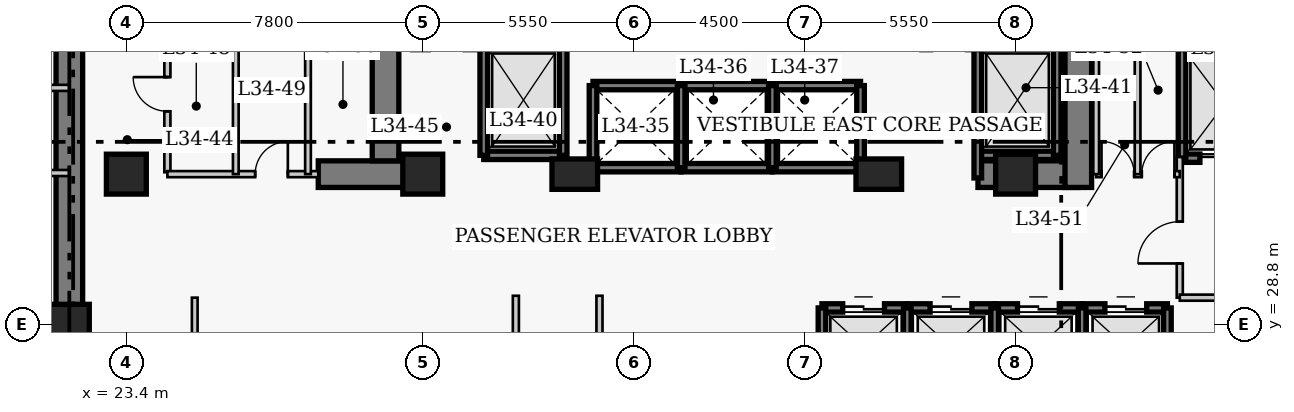
"""IFC4 building model, lengths in metres.
Left out: names, types, materials, properties, quantities, classifications, styles, units other than length and angle.
Written with IfcOpenShell. Run it as: python <this file> out.ifc"""

import sys

from ifc_helpers import new_model, si_unit, direction, frame, frame_2d, origin, origin_2d, place, context, subcontext, project, spatial, rectangle, extrude, element, fill, save


model = new_model("IFC4")
c1 = context("Model", 3, precision=1e-05, world=origin(), true_north=direction((0.0, 1.0)))
c2 = subcontext(c1, "Body", "Model", "MODEL_VIEW")
j1 = project(units=[si_unit("LENGTHUNIT", "METRE"), si_unit("PLANEANGLEUNIT", "RADIAN")], contexts=[c1])
p1 = place(None, origin())
s1 = spatial("IfcSite", under=j1, at=p1, CompositionType="ELEMENT")
p2 = place(p1, origin())
s2 = spatial("IfcBuilding", under=s1, at=p2, CompositionType="ELEMENT")
p3 = place(p2, frame((0.0, 0.0, 138.4)))
s3 = spatial("IfcBuildingStorey", under=s2, at=p3, CompositionType="ELEMENT", Elevation=138.4)
p4 = place(p3, frame((21.9, 27.05, 0.0), z_axis=(0.0, 0.0, 1.0), x_axis=(0.0, 1.0, 0.0)))
e1 = element("IfcWall", 1, at=p4, inside=s3, PredefinedType="SHEAR", context=c2, shape_type="SweptSolid", body=[
    extrude(rectangle(XDim=13.62, YDim=0.7, at=frame_2d((6.81, 0.0))), origin(), (0.0, 0.0, 1.0), 3.8),
])
p5 = place(p3, frame((28.45, 32.75, 0.0), z_axis=(0.0, 0.0, 1.0), x_axis=(1.0, 0.0, 0.0)))
e2 = element("IfcWall", 2, at=p5, inside=s3, PredefinedType="SHEAR", context=c2, shape_type="SweptSolid", body=[
    extrude(rectangle(XDim=2.4, YDim=0.7, at=frame_2d((1.2, 0.0))), origin(), (0.0, 0.0, 1.0), 3.8),
])
p6 = place(p3, frame((45.81, 32.75, 0.0), z_axis=(0.0, 0.0, 1.0), x_axis=(1.0, 0.0, 0.0)))
e3 = element("IfcWall", 3, at=p6, inside=s3, PredefinedType="SHEAR", context=c2, shape_type="SweptSolid", body=[
    extrude(rectangle(XDim=2.64, YDim=0.7, at=frame_2d((1.32, 0.0))), origin(), (0.0, 0.0, 1.0), 3.8),
])
p7 = place(p3, frame((30.22, 33.1, 0.0), z_axis=(0.0, 0.0, 1.0), x_axis=(0.0, 1.0, 0.0)))
e4 = element("IfcWall", 4, at=p7, inside=s3, PredefinedType="SHEAR", context=c2, shape_type="SweptSolid", body=[
    extrude(rectangle(XDim=7.22, YDim=0.7, at=frame_2d((3.61, 0.0))), origin(), (0.0, 0.0, 1.0), 3.8),
])
p8 = place(p3, frame((48.45, 32.4, 0.0), z_axis=(0.0, 0.0, 1.0), x_axis=(0.0, 1.0, 0.0)))
e5 = element("IfcWall", 5, at=p8, inside=s3, PredefinedType="SHEAR", context=c2, shape_type="SweptSolid", body=[
    extrude(rectangle(XDim=7.92, YDim=0.7, at=frame_2d((3.96, 0.0))), origin(), (0.0, 0.0, 1.0), 3.8),
])
p9 = place(p8, frame((5.8, 0.0, 0.0)))
e6 = element("IfcOpeningElement", 6, at=p9, cuts=e5, PredefinedType="OPENING", context=c2, shape_type="SweptSolid", body=[
    extrude(rectangle(XDim=1.1, YDim=2.15, at=frame_2d((0.55, 1.075))), frame((0.0, 0.36, 0.0), z_axis=(0.0, -1.0, 0.0), x_axis=(1.0, 0.0, 0.0)), (0.0, 0.0, 1.0), 0.72),
])
for number, where, z_axis, x_axis in (
    (7, (21.9, 28.8, 0.0), (0.0, 0.0, 1.0), (1.0, 0.0, 0.0)),
    (8, (23.4, 32.75, 0.0), (0.0, 0.0, 1.0), (1.0, 0.0, 0.0)),
    (9, (31.2, 32.75, 0.0), (0.0, 0.0, 1.0), (1.0, 0.0, 0.0)),
):
    element("IfcColumn", number, at=place(p3, frame(where, z_axis=z_axis, x_axis=x_axis)), inside=s3, PredefinedType="COLUMN", context=c2, shape_type="SweptSolid", body=[
        extrude(rectangle(XDim=1.05, YDim=1.05, at=origin_2d()), origin(), (0.0, 0.0, 1.0), 3.8),
    ])
for number, where, z_axis, x_axis in (
    (10, (35.2, 32.75, 0.0), (0.0, 0.0, 1.0), (1.0, 0.0, 0.0)),
    (11, (43.2, 32.75, 0.0), (0.0, 0.0, 1.0), (1.0, 0.0, 0.0)),
):
    element("IfcColumn", number, at=place(p3, frame(where, z_axis=z_axis, x_axis=x_axis)), inside=s3, PredefinedType="COLUMN", context=c2, shape_type="SweptSolid", body=[
        extrude(rectangle(XDim=1.2, YDim=0.8, at=origin_2d()), origin(), (0.0, 0.0, 1.0), 3.8),
    ])
p10 = place(p3, frame((46.8, 32.75, 0.0), z_axis=(0.0, 0.0, 1.0), x_axis=(1.0, 0.0, 0.0)))
e12 = element("IfcColumn", 12, at=p10, inside=s3, PredefinedType="COLUMN", context=c2, shape_type="SweptSolid", body=[
    extrude(rectangle(XDim=1.05, YDim=1.05, at=origin_2d()), origin(), (0.0, 0.0, 1.0), 3.8),
])
p11 = place(p3, frame((41.705, 29.23, 0.0), z_axis=(0.0, 0.0, 1.0), x_axis=(1.0, 0.0, 0.0)))
e13 = element("IfcWall", 13, at=p11, inside=s3, PredefinedType="SHEAR", context=c2, shape_type="SweptSolid", body=[
    extrude(rectangle(XDim=2.245, YDim=0.22, at=frame_2d((1.123, 0.0))), origin(), (0.0, 0.0, 1.0), 3.8),
])
p12 = place(p11, frame((0.545, 0.0, 0.0)))
e14 = element("IfcOpeningElement", 14, at=p12, cuts=e13, PredefinedType="OPENING", context=c2, shape_type="SweptSolid", body=[
    extrude(rectangle(XDim=1.1, YDim=2.15, at=frame_2d((0.55, 1.075))), frame((0.0, 0.12, 0.0), z_axis=(0.0, -1.0, 0.0), x_axis=(1.0, 0.0, 0.0)), (0.0, 0.0, 1.0), 0.24),
])
p13 = place(p3, frame((41.705, 27.17, 0.0), z_axis=(0.0, 0.0, 1.0), x_axis=(0.0, 1.0, 0.0)))
e15 = element("IfcWall", 15, at=p13, inside=s3, PredefinedType="SHEAR", context=c2, shape_type="SweptSolid", body=[
    extrude(rectangle(XDim=2.06, YDim=0.2, at=frame_2d((1.03, 0.0))), origin(), (0.0, 0.0, 1.0), 3.8),
])
p14 = place(p3, frame((43.95, 29.23, 0.0), z_axis=(0.0, 0.0, 1.0), x_axis=(1.0, 0.0, 0.0)))
e16 = element("IfcWall", 16, at=p14, inside=s3, PredefinedType="SHEAR", context=c2, shape_type="SweptSolid", body=[
    extrude(rectangle(XDim=2.3, YDim=0.22, at=frame_2d((1.15, 0.0))), origin(), (0.0, 0.0, 1.0), 3.8),
])
p15 = place(p14, frame((0.6, 0.0, 0.0)))
e17 = element("IfcOpeningElement", 17, at=p15, cuts=e16, PredefinedType="OPENING", context=c2, shape_type="SweptSolid", body=[
    extrude(rectangle(XDim=1.1, YDim=2.15, at=frame_2d((0.55, 1.075))), frame((0.0, 0.12, 0.0), z_axis=(0.0, -1.0, 0.0), x_axis=(1.0, 0.0, 0.0)), (0.0, 0.0, 1.0), 0.24),
])
p16 = place(p3, frame((43.95, 27.17, 0.0), z_axis=(0.0, 0.0, 1.0), x_axis=(0.0, 1.0, 0.0)))
e18 = element("IfcWall", 18, at=p16, inside=s3, PredefinedType="SHEAR", context=c2, shape_type="SweptSolid", body=[
    extrude(rectangle(XDim=2.06, YDim=0.2, at=frame_2d((1.03, 0.0))), origin(), (0.0, 0.0, 1.0), 3.8),
])
p17 = place(p3, frame((46.25, 29.23, 0.0), z_axis=(0.0, 0.0, 1.0), x_axis=(1.0, 0.0, 0.0)))
e19 = element("IfcWall", 19, at=p17, inside=s3, PredefinedType="SHEAR", context=c2, shape_type="SweptSolid", body=[
    extrude(rectangle(XDim=2.3, YDim=0.22, at=frame_2d((1.15, 0.0))), origin(), (0.0, 0.0, 1.0), 3.8),
])
p18 = place(p17, frame((0.6, 0.0, 0.0)))
e20 = element("IfcOpeningElement", 20, at=p18, cuts=e19, PredefinedType="OPENING", context=c2, shape_type="SweptSolid", body=[
    extrude(rectangle(XDim=1.1, YDim=2.15, at=frame_2d((0.55, 1.075))), frame((0.0, 0.12, 0.0), z_axis=(0.0, -1.0, 0.0), x_axis=(1.0, 0.0, 0.0)), (0.0, 0.0, 1.0), 0.24),
])
p19 = place(p3, frame((46.25, 27.17, 0.0), z_axis=(0.0, 0.0, 1.0), x_axis=(0.0, 1.0, 0.0)))
e21 = element("IfcWall", 21, at=p19, inside=s3, PredefinedType="SHEAR", context=c2, shape_type="SweptSolid", body=[
    extrude(rectangle(XDim=2.06, YDim=0.2, at=frame_2d((1.03, 0.0))), origin(), (0.0, 0.0, 1.0), 3.8),
])
p20 = place(p3, frame((48.55, 29.23, 0.0), z_axis=(0.0, 0.0, 1.0), x_axis=(1.0, 0.0, 0.0)))
e22 = element("IfcWall", 22, at=p20, inside=s3, PredefinedType="SHEAR", context=c2, shape_type="SweptSolid", body=[
    extrude(rectangle(XDim=2.245, YDim=0.22, at=frame_2d((1.123, 0.0))), origin(), (0.0, 0.0, 1.0), 3.8),
])
p21 = place(p20, frame((0.6, 0.0, 0.0)))
e23 = element("IfcOpeningElement", 23, at=p21, cuts=e22, PredefinedType="OPENING", context=c2, shape_type="SweptSolid", body=[
    extrude(rectangle(XDim=1.1, YDim=2.15, at=frame_2d((0.55, 1.075))), frame((0.0, 0.12, 0.0), z_axis=(0.0, -1.0, 0.0), x_axis=(1.0, 0.0, 0.0)), (0.0, 0.0, 1.0), 0.24),
])
for number, where, z_axis, x_axis in (
    (24, (48.55, 27.17, 0.0), (0.0, 0.0, 1.0), (0.0, 1.0, 0.0)),
    (25, (50.795, 27.17, 0.0), (0.0, 0.0, 1.0), (0.0, 1.0, 0.0)),
):
    element("IfcWall", number, at=place(p3, frame(where, z_axis=z_axis, x_axis=x_axis)), inside=s3, PredefinedType="SHEAR", context=c2, shape_type="SweptSolid", body=[
        extrude(rectangle(XDim=2.06, YDim=0.2, at=frame_2d((1.03, 0.0))), origin(), (0.0, 0.0, 1.0), 3.8),
    ])
for number, where, z_axis, x_axis in (
    (26, (35.68, 35.08, 0.0), (0.0, 0.0, 1.0), (1.0, 0.0, 0.0)),
    (27, (35.68, 32.92, 0.0), (0.0, 0.0, 1.0), (1.0, 0.0, 0.0)),
):
    element("IfcWall", number, at=place(p3, frame(where, z_axis=z_axis, x_axis=x_axis)), inside=s3, PredefinedType="SHEAR", context=c2, shape_type="SweptSolid", body=[
        extrude(rectangle(XDim=2.32, YDim=0.22, at=frame_2d((1.16, 0.0))), origin(), (0.0, 0.0, 1.0), 3.8),
    ])
p22 = place(p3, frame((35.68, 32.92, 0.0), z_axis=(0.0, 0.0, 1.0), x_axis=(0.0, 1.0, 0.0)))
e28 = element("IfcWall", 28, at=p22, inside=s3, PredefinedType="SHEAR", context=c2, shape_type="SweptSolid", body=[
    extrude(rectangle(XDim=2.16, YDim=0.2, at=frame_2d((1.08, 0.0))), origin(), (0.0, 0.0, 1.0), 3.8),
])
for number, where, z_axis, x_axis in (
    (29, (38.0, 35.08, 0.0), (0.0, 0.0, 1.0), (1.0, 0.0, 0.0)),
    (30, (38.0, 32.92, 0.0), (0.0, 0.0, 1.0), (1.0, 0.0, 0.0)),
):
    element("IfcWall", number, at=place(p3, frame(where, z_axis=z_axis, x_axis=x_axis)), inside=s3, PredefinedType="SHEAR", context=c2, shape_type="SweptSolid", body=[
        extrude(rectangle(XDim=2.4, YDim=0.22, at=frame_2d((1.2, 0.0))), origin(), (0.0, 0.0, 1.0), 3.8),
    ])
p23 = place(p3, frame((38.0, 32.92, 0.0), z_axis=(0.0, 0.0, 1.0), x_axis=(0.0, 1.0, 0.0)))
e31 = element("IfcWall", 31, at=p23, inside=s3, PredefinedType="SHEAR", context=c2, shape_type="SweptSolid", body=[
    extrude(rectangle(XDim=2.16, YDim=0.2, at=frame_2d((1.08, 0.0))), origin(), (0.0, 0.0, 1.0), 3.8),
])
for number, where, z_axis, x_axis in (
    (32, (40.4, 35.08, 0.0), (0.0, 0.0, 1.0), (1.0, 0.0, 0.0)),
    (33, (40.4, 32.92, 0.0), (0.0, 0.0, 1.0), (1.0, 0.0, 0.0)),
):
    element("IfcWall", number, at=place(p3, frame(where, z_axis=z_axis, x_axis=x_axis)), inside=s3, PredefinedType="SHEAR", context=c2, shape_type="SweptSolid", body=[
        extrude(rectangle(XDim=2.32, YDim=0.22, at=frame_2d((1.16, 0.0))), origin(), (0.0, 0.0, 1.0), 3.8),
    ])
for number, where, z_axis, x_axis in (
    (34, (40.4, 32.92, 0.0), (0.0, 0.0, 1.0), (0.0, 1.0, 0.0)),
    (35, (42.72, 32.92, 0.0), (0.0, 0.0, 1.0), (0.0, 1.0, 0.0)),
):
    element("IfcWall", number, at=place(p3, frame(where, z_axis=z_axis, x_axis=x_axis)), inside=s3, PredefinedType="SHEAR", context=c2, shape_type="SweptSolid", body=[
        extrude(rectangle(XDim=2.16, YDim=0.2, at=frame_2d((1.08, 0.0))), origin(), (0.0, 0.0, 1.0), 3.8),
    ])
p24 = place(p3, frame((51.18, 36.03, 0.0), z_axis=(0.0, 0.0, 1.0), x_axis=(1.0, 0.0, 0.0)))
e36 = element("IfcWall", 36, at=p24, inside=s3, PredefinedType="SHEAR", context=c2, shape_type="SweptSolid", body=[
    extrude(rectangle(XDim=2.42, YDim=0.22, at=frame_2d((1.21, 0.0))), origin(), (0.0, 0.0, 1.0), 3.8),
])
p25 = place(p3, frame((51.18, 33.17, 0.0), z_axis=(0.0, 0.0, 1.0), x_axis=(1.0, 0.0, 0.0)))
e37 = element("IfcWall", 37, at=p25, inside=s3, PredefinedType="SHEAR", context=c2, shape_type="SweptSolid", body=[
    extrude(rectangle(XDim=2.42, YDim=0.22, at=frame_2d((1.21, 0.0))), origin(), (0.0, 0.0, 1.0), 3.8),
])
p26 = place(p25, frame((0.47, 0.0, 0.0)))
e38 = element("IfcOpeningElement", 38, at=p26, cuts=e37, PredefinedType="OPENING", context=c2, shape_type="SweptSolid", body=[
    extrude(rectangle(XDim=1.3, YDim=2.15, at=frame_2d((0.65, 1.075))), frame((0.0, 0.12, 0.0), z_axis=(0.0, -1.0, 0.0), x_axis=(1.0, 0.0, 0.0)), (0.0, 0.0, 1.0), 0.24),
])
p27 = place(p3, frame((51.18, 33.17, 0.0), z_axis=(0.0, 0.0, 1.0), x_axis=(0.0, 1.0, 0.0)))
e39 = element("IfcWall", 39, at=p27, inside=s3, PredefinedType="SHEAR", context=c2, shape_type="SweptSolid", body=[
    extrude(rectangle(XDim=2.86, YDim=0.2, at=frame_2d((1.43, 0.0))), origin(), (0.0, 0.0, 1.0), 3.8),
])
p28 = place(p3, frame((32.805, 33.245, 0.0), z_axis=(0.0, 0.0, 1.0), x_axis=(1.0, 0.0, 0.0)))
e40 = element("IfcWall", 40, at=p28, inside=s3, PredefinedType="SHEAR", context=c2, shape_type="SweptSolid", body=[
    extrude(rectangle(XDim=2.09, YDim=0.22, at=frame_2d((1.045, 0.0))), origin(), (0.0, 0.0, 1.0), 3.8),
])
for number, where, z_axis, x_axis in (
    (41, (32.805, 33.245, 0.0), (0.0, 0.0, 1.0), (0.0, 1.0, 0.0)),
    (42, (34.895, 33.245, 0.0), (0.0, 0.0, 1.0), (0.0, 1.0, 0.0)),
):
    element("IfcWall", number, at=place(p3, frame(where, z_axis=z_axis, x_axis=x_axis)), inside=s3, PredefinedType="SHEAR", context=c2, shape_type="SweptSolid", body=[
        extrude(rectangle(XDim=2.91, YDim=0.2, at=frame_2d((1.455, 0.0))), origin(), (0.0, 0.0, 1.0), 3.8),
    ])
p29 = place(p3, frame((45.805, 33.245, 0.0), z_axis=(0.0, 0.0, 1.0), x_axis=(1.0, 0.0, 0.0)))
e43 = element("IfcWall", 43, at=p29, inside=s3, PredefinedType="SHEAR", context=c2, shape_type="SweptSolid", body=[
    extrude(rectangle(XDim=2.09, YDim=0.22, at=frame_2d((1.045, 0.0))), origin(), (0.0, 0.0, 1.0), 3.8),
])
p30 = place(p3, frame((45.805, 32.65, 0.0), z_axis=(0.0, 0.0, 1.0), x_axis=(0.0, 1.0, 0.0)))
e44 = element("IfcWall", 44, at=p30, inside=s3, PredefinedType="SHEAR", context=c2, shape_type="SweptSolid", body=[
    extrude(rectangle(XDim=3.505, YDim=0.2, at=frame_2d((1.752, 0.0))), origin(), (0.0, 0.0, 1.0), 3.8),
])
p31 = place(p3, frame((47.895, 33.245, 0.0), z_axis=(0.0, 0.0, 1.0), x_axis=(0.0, 1.0, 0.0)))
e45 = element("IfcWall", 45, at=p31, inside=s3, PredefinedType="SHEAR", context=c2, shape_type="SweptSolid", body=[
    extrude(rectangle(XDim=2.91, YDim=0.2, at=frame_2d((1.455, 0.0))), origin(), (0.0, 0.0, 1.0), 3.8),
])
p32 = place(p3, frame((24.48, 32.8, 0.0), z_axis=(0.0, 0.0, 1.0), x_axis=(0.0, 1.0, 0.0)))
e46 = element("IfcWall", 46, at=p32, inside=s3, PredefinedType="PARTITIONING", context=c2, shape_type="SweptSolid", body=[
    extrude(rectangle(XDim=3.57, YDim=0.16, at=frame_2d((1.785, 0.0))), origin(), (0.0, 0.0, 1.0), 3.55),
])
p33 = place(p32, frame((1.604, 0.0, 0.0)))
e47 = element("IfcOpeningElement", 47, at=p33, cuts=e46, PredefinedType="OPENING", context=c2, shape_type="SweptSolid", body=[
    extrude(rectangle(XDim=0.9, YDim=2.1, at=frame_2d((0.45, 1.05))), frame((0.0, 0.09, 0.0), z_axis=(0.0, -1.0, 0.0), x_axis=(1.0, 0.0, 0.0)), (0.0, 0.0, 1.0), 0.18),
])
p34 = place(p3, frame((51.12, 29.5, 0.0), z_axis=(0.0, 0.0, 1.0), x_axis=(0.0, 1.0, 0.0)))
e48 = element("IfcWall", 48, at=p34, inside=s3, PredefinedType="PARTITIONING", context=c2, shape_type="SweptSolid", body=[
    extrude(rectangle(XDim=3.7, YDim=0.16, at=frame_2d((1.85, 0.0))), origin(), (0.0, 0.0, 1.0), 3.55),
])
p35 = place(p34, frame((0.9, 0.0, 0.0)))
e49 = element("IfcOpeningElement", 49, at=p35, cuts=e48, PredefinedType="OPENING", context=c2, shape_type="SweptSolid", body=[
    extrude(rectangle(XDim=1.1, YDim=2.15, at=frame_2d((0.55, 1.075))), frame((0.0, 0.09, 0.0), z_axis=(0.0, -1.0, 0.0), x_axis=(1.0, 0.0, 0.0)), (0.0, 0.0, 1.0), 0.18),
])
p36 = place(p3, frame((51.12, 29.5, 0.0), z_axis=(0.0, 0.0, 1.0), x_axis=(1.0, 0.0, 0.0)))
e50 = element("IfcWall", 50, at=p36, inside=s3, PredefinedType="PARTITIONING", context=c2, shape_type="SweptSolid", body=[
    extrude(rectangle(XDim=5.63, YDim=0.16, at=frame_2d((2.815, 0.0))), origin(), (0.0, 0.0, 1.0), 3.55),
])
p37 = place(p3, frame((24.48, 32.75, 0.0), z_axis=(0.0, 0.0, 1.0), x_axis=(1.0, 0.0, 0.0)))
e51 = element("IfcWall", 51, at=p37, inside=s3, PredefinedType="PARTITIONING", context=c2, shape_type="SweptSolid", body=[
    extrude(rectangle(XDim=3.97, YDim=0.16, at=frame_2d((1.985, 0.0))), origin(), (0.0, 0.0, 1.0), 3.55),
])
p38 = place(p37, frame((2.31, 0.0, 0.0)))
e52 = element("IfcOpeningElement", 52, at=p38, cuts=e51, PredefinedType="OPENING", context=c2, shape_type="SweptSolid", body=[
    extrude(rectangle(XDim=0.86, YDim=2.05, at=frame_2d((0.43, 1.025))), frame((0.0, 0.09, 0.0), z_axis=(0.0, -1.0, 0.0), x_axis=(1.0, 0.0, 0.0)), (0.0, 0.0, 1.0), 0.18),
])
p39 = place(p3, frame((48.92, 32.75, 0.0), z_axis=(0.0, 0.0, 1.0), x_axis=(1.0, 0.0, 0.0)))
e53 = element("IfcWall", 53, at=p39, inside=s3, PredefinedType="PARTITIONING", context=c2, shape_type="SweptSolid", body=[
    extrude(rectangle(XDim=2.2, YDim=0.16, at=frame_2d((1.1, 0.0))), origin(), (0.0, 0.0, 1.0), 3.55),
])
p40 = place(p39, frame((0.14, 0.0, 0.0)))
e54 = element("IfcOpeningElement", 54, at=p40, cuts=e53, PredefinedType="OPENING", context=c2, shape_type="SweptSolid", body=[
    extrude(rectangle(XDim=0.86, YDim=2.05, at=frame_2d((0.43, 1.025))), frame((0.0, 0.09, 0.0), z_axis=(0.0, -1.0, 0.0), x_axis=(1.0, 0.0, 0.0)), (0.0, 0.0, 1.0), 0.18),
])
p41 = place(p39, frame((1.2, 0.0, 0.0)))
e55 = element("IfcOpeningElement", 55, at=p41, cuts=e53, PredefinedType="OPENING", context=c2, shape_type="SweptSolid", body=[
    extrude(rectangle(XDim=0.86, YDim=2.05, at=frame_2d((0.43, 1.025))), frame((0.0, 0.09, 0.0), z_axis=(0.0, -1.0, 0.0), x_axis=(1.0, 0.0, 0.0)), (0.0, 0.0, 1.0), 0.18),
])
for number, where, z_axis, x_axis in (
    (56, (48.92, 32.75, 0.0), (0.0, 0.0, 1.0), (0.0, 1.0, 0.0)),
    (57, (26.28, 32.75, 0.0), (0.0, 0.0, 1.0), (0.0, 1.0, 0.0)),
    (58, (28.18, 32.75, 0.0), (0.0, 0.0, 1.0), (0.0, 1.0, 0.0)),
    (59, (50.01, 32.75, 0.0), (0.0, 0.0, 1.0), (0.0, 1.0, 0.0)),
):
    element("IfcWall", number, at=place(p3, frame(where, z_axis=z_axis, x_axis=x_axis)), inside=s3, PredefinedType="PARTITIONING", context=c2, shape_type="SweptSolid", body=[
        extrude(rectangle(XDim=3.62, YDim=0.15, at=frame_2d((1.81, 0.0))), origin(), (0.0, 0.0, 1.0), 3.55),
    ])
for number, where, z_axis, x_axis in (
    (60, (33.65, 19.01, 0.0), (0.0, 0.0, 1.0), (0.0, 1.0, 0.0)),
    (61, (35.85, 19.01, 0.0), (0.0, 0.0, 1.0), (0.0, 1.0, 0.0)),
):
    element("IfcWall", number, at=place(p3, frame(where, z_axis=z_axis, x_axis=x_axis)), inside=s3, PredefinedType="PARTITIONING", context=c2, shape_type="SweptSolid", body=[
        extrude(rectangle(XDim=10.54, YDim=0.16, at=frame_2d((5.27, 0.0))), origin(), (0.0, 0.0, 1.0), 3.55),
    ])
for number, where, z_axis, x_axis in (
    (62, (19.16, 35.02, 0.0), (0.0, 0.0, 1.0), (1.0, 0.0, 0.0)),
    (63, (19.16, 32.78, 0.0), (0.0, 0.0, 1.0), (1.0, 0.0, 0.0)),
):
    element("IfcWall", number, at=place(p3, frame(where, z_axis=z_axis, x_axis=x_axis)), inside=s3, PredefinedType="PARTITIONING", context=c2, shape_type="SweptSolid", body=[
        extrude(rectangle(XDim=2.74, YDim=0.16, at=frame_2d((1.37, 0.0))), origin(), (0.0, 0.0, 1.0), 3.55),
    ])
p42 = place(p3, frame((25.2, 19.01, 0.0), z_axis=(0.0, 0.0, 1.0), x_axis=(0.0, 1.0, 0.0)))
e64 = element("IfcWall", 64, at=p42, inside=s3, PredefinedType="PARTITIONING", context=c2, shape_type="SweptSolid", body=[
    extrude(rectangle(XDim=10.49, YDim=0.15, at=frame_2d((5.245, 0.0))), origin(), (0.0, 0.0, 1.0), 3.55),
])
p43 = place(p12, origin())
e65 = element("IfcDoor", 65, at=p43, inside=s3, OperationType="DOUBLE_DOOR_SLIDING", PredefinedType="DOOR", context=c2, shape_type="SweptSolid", body=[
    extrude(rectangle(XDim=1.1, YDim=2.15, at=frame_2d((0.55, 1.075))), frame((0.0, 0.025, 0.0), z_axis=(0.0, -1.0, 0.0), x_axis=(1.0, 0.0, 0.0)), (0.0, 0.0, 1.0), 0.05),
])
fill(e14, e65)
p44 = place(p15, origin())
e66 = element("IfcDoor", 66, at=p44, inside=s3, OperationType="DOUBLE_DOOR_SLIDING", PredefinedType="DOOR", context=c2, shape_type="SweptSolid", body=[
    extrude(rectangle(XDim=1.1, YDim=2.15, at=frame_2d((0.55, 1.075))), frame((0.0, 0.025, 0.0), z_axis=(0.0, -1.0, 0.0), x_axis=(1.0, 0.0, 0.0)), (0.0, 0.0, 1.0), 0.05),
])
fill(e17, e66)
p45 = place(p18, origin())
e67 = element("IfcDoor", 67, at=p45, inside=s3, OperationType="DOUBLE_DOOR_SLIDING", PredefinedType="DOOR", context=c2, shape_type="SweptSolid", body=[
    extrude(rectangle(XDim=1.1, YDim=2.15, at=frame_2d((0.55, 1.075))), frame((0.0, 0.025, 0.0), z_axis=(0.0, -1.0, 0.0), x_axis=(1.0, 0.0, 0.0)), (0.0, 0.0, 1.0), 0.05),
])
fill(e20, e67)
p46 = place(p21, origin())
e68 = element("IfcDoor", 68, at=p46, inside=s3, OperationType="DOUBLE_DOOR_SLIDING", PredefinedType="DOOR", context=c2, shape_type="SweptSolid", body=[
    extrude(rectangle(XDim=1.1, YDim=2.15, at=frame_2d((0.55, 1.075))), frame((0.0, 0.025, 0.0), z_axis=(0.0, -1.0, 0.0), x_axis=(1.0, 0.0, 0.0)), (0.0, 0.0, 1.0), 0.05),
])
fill(e23, e68)
p47 = place(p26, origin())
e69 = element("IfcDoor", 69, at=p47, inside=s3, OperationType="DOUBLE_DOOR_SLIDING", PredefinedType="DOOR", context=c2, shape_type="SweptSolid", body=[
    extrude(rectangle(XDim=1.3, YDim=2.15, at=frame_2d((0.65, 1.075))), frame((0.0, 0.025, 0.0), z_axis=(0.0, -1.0, 0.0), x_axis=(1.0, 0.0, 0.0)), (0.0, 0.0, 1.0), 0.05),
])
fill(e38, e69)
p48 = place(p35, origin())
e70 = element("IfcDoor", 70, at=p48, inside=s3, OperationType="SINGLE_SWING_LEFT", PredefinedType="DOOR", context=c2, shape_type="SweptSolid", body=[
    extrude(rectangle(XDim=1.1, YDim=2.15, at=frame_2d((0.55, 1.075))), frame((0.0, 0.025, 0.0), z_axis=(0.0, -1.0, 0.0), x_axis=(1.0, 0.0, 0.0)), (0.0, 0.0, 1.0), 0.05),
])
fill(e49, e70)
p49 = place(p33, origin())
e71 = element("IfcDoor", 71, at=p49, inside=s3, OperationType="SINGLE_SWING_RIGHT", PredefinedType="DOOR", context=c2, shape_type="SweptSolid", body=[
    extrude(rectangle(XDim=0.9, YDim=2.1, at=frame_2d((0.45, 1.05))), frame((0.0, 0.025, 0.0), z_axis=(0.0, -1.0, 0.0), x_axis=(1.0, 0.0, 0.0)), (0.0, 0.0, 1.0), 0.05),
])
fill(e47, e71)
p50 = place(p38, origin())
e72 = element("IfcDoor", 72, at=p50, inside=s3, OperationType="SINGLE_SWING_RIGHT", PredefinedType="DOOR", context=c2, shape_type="SweptSolid", body=[
    extrude(rectangle(XDim=0.86, YDim=2.05, at=frame_2d((0.43, 1.025))), frame((0.0, 0.025, 0.0), z_axis=(0.0, -1.0, 0.0), x_axis=(1.0, 0.0, 0.0)), (0.0, 0.0, 1.0), 0.05),
])
fill(e52, e72)
p51 = place(p40, origin())
e73 = element("IfcDoor", 73, at=p51, inside=s3, OperationType="SINGLE_SWING_LEFT", PredefinedType="DOOR", context=c2, shape_type="SweptSolid", body=[
    extrude(rectangle(XDim=0.86, YDim=2.05, at=frame_2d((0.43, 1.025))), frame((0.0, 0.025, 0.0), z_axis=(0.0, -1.0, 0.0), x_axis=(1.0, 0.0, 0.0)), (0.0, 0.0, 1.0), 0.05),
])
fill(e54, e73)
p52 = place(p41, origin())
e74 = element("IfcDoor", 74, at=p52, inside=s3, OperationType="SINGLE_SWING_RIGHT", PredefinedType="DOOR", context=c2, shape_type="SweptSolid", body=[
    extrude(rectangle(XDim=0.86, YDim=2.05, at=frame_2d((0.43, 1.025))), frame((0.0, 0.025, 0.0), z_axis=(0.0, -1.0, 0.0), x_axis=(1.0, 0.0, 0.0)), (0.0, 0.0, 1.0), 0.05),
])
fill(e55, e74)
save(model, sys.argv[1])
